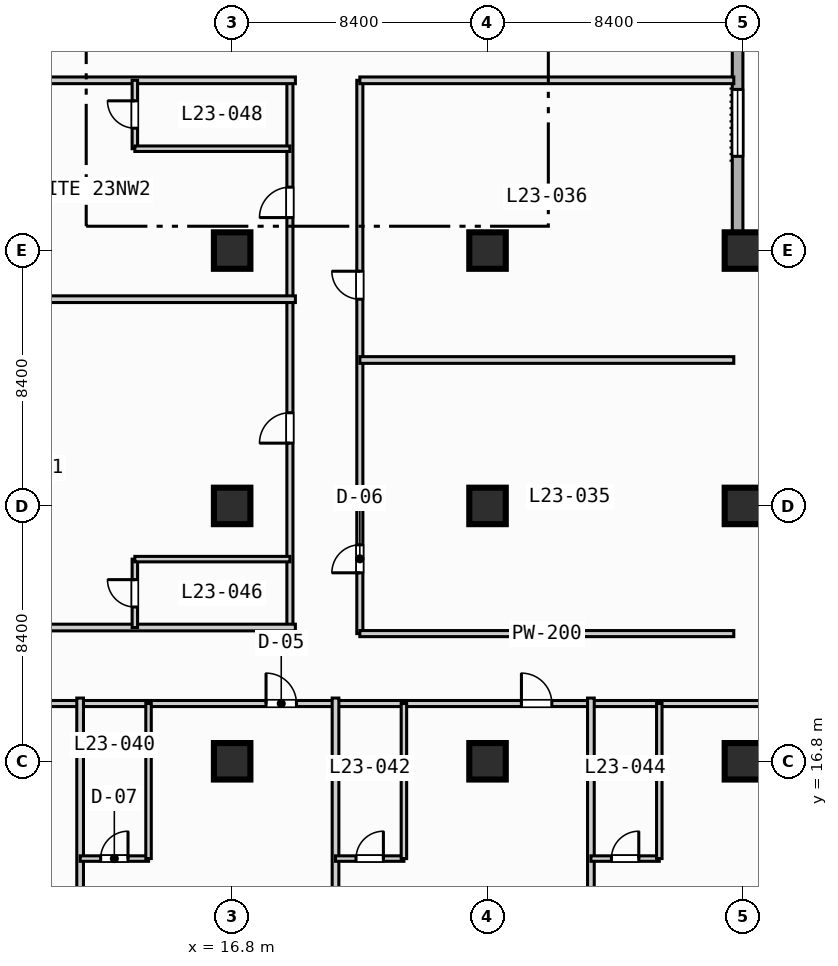
"""IFC4 building model, lengths in metres.
Left out: names, types, materials, properties, quantities, classifications, styles, units other than length and angle.
Written with IfcOpenShell. Run it as: python <this file> out.ifc"""

import sys

from ifc_helpers import new_model, si_unit, direction, frame, frame_2d, origin, origin_2d, place, context, subcontext, project, spatial, rectangle, extrude, element, fill, save


model = new_model("IFC4")
c1 = context("Model", 3, precision=1e-05, world=origin(), true_north=direction((0.0, 1.0)))
c2 = subcontext(c1, "Body", "Model", "MODEL_VIEW")
j1 = project(units=[si_unit("LENGTHUNIT", "METRE"), si_unit("PLANEANGLEUNIT", "RADIAN")], contexts=[c1])
p1 = place(None, origin())
s1 = spatial("IfcSite", under=j1, at=p1, CompositionType="ELEMENT")
p2 = place(p1, origin())
s2 = spatial("IfcBuilding", under=s1, at=p2, CompositionType="ELEMENT")
p3 = place(p2, frame((0.0, 0.0, 100.0)))
s3 = spatial("IfcBuildingStorey", under=s2, at=p3, CompositionType="ELEMENT", Elevation=100.0)
for number, where, z_axis, x_axis in (
    (1, (16.8, 16.8, 0.0), (0.0, 0.0, 1.0), (1.0, 0.0, 0.0)),
    (2, (16.8, 25.2, 0.0), (0.0, 0.0, 1.0), (1.0, 0.0, 0.0)),
    (3, (16.8, 33.6, 0.0), (0.0, 0.0, 1.0), (1.0, 0.0, 0.0)),
    (4, (25.2, 16.8, 0.0), (0.0, 0.0, 1.0), (1.0, 0.0, 0.0)),
    (5, (25.2, 25.2, 0.0), (0.0, 0.0, 1.0), (1.0, 0.0, 0.0)),
    (6, (25.2, 33.6, 0.0), (0.0, 0.0, 1.0), (1.0, 0.0, 0.0)),
    (7, (33.6, 16.8, 0.0), (0.0, 0.0, 1.0), (1.0, 0.0, 0.0)),
    (8, (33.6, 25.2, 0.0), (0.0, 0.0, 1.0), (1.0, 0.0, 0.0)),
    (9, (33.6, 33.6, 0.0), (0.0, 0.0, 1.0), (1.0, 0.0, 0.0)),
):
    element("IfcColumn", number, at=place(p3, frame(where, z_axis=z_axis, x_axis=x_axis)), inside=s3, PredefinedType="COLUMN", context=c2, shape_type="SweptSolid", body=[
        extrude(rectangle(XDim=1.2, YDim=1.2, at=origin_2d()), origin(), (0.0, 0.0, 1.0), 3.8),
    ])
p4 = place(p3, frame((33.425, 89.225, 0.0), z_axis=(0.0, 0.0, 1.0), x_axis=(0.0, -1.0, 0.0)))
e10 = element("IfcWall", 10, at=p4, inside=s3, PredefinedType="STANDARD", context=c2, shape_type="SweptSolid", body=[
    extrude(rectangle(XDim=55.8, YDim=0.35, at=frame_2d((27.9, 0.0))), origin(), (0.0, 0.0, 1.0), 3.55),
])
p5 = place(p4, frame((50.325, 0.0, 0.85)))
e11 = element("IfcOpeningElement", 11, at=p5, cuts=e10, PredefinedType="OPENING", context=c2, shape_type="SweptSolid", body=[
    extrude(rectangle(XDim=2.2, YDim=1.8, at=frame_2d((1.1, 0.9))), frame((0.0, 0.185, 0.0), z_axis=(0.0, -1.0, 0.0), x_axis=(1.0, 0.0, 0.0)), (0.0, 0.0, 1.0), 0.37),
])
p6 = place(p4, frame((33.525, 0.0, 0.85)))
e12 = element("IfcOpeningElement", 12, at=p6, cuts=e10, PredefinedType="OPENING", context=c2, shape_type="SweptSolid", body=[
    extrude(rectangle(XDim=2.2, YDim=1.8, at=frame_2d((1.1, 0.9))), frame((0.0, 0.185, 0.0), z_axis=(0.0, -1.0, 0.0), x_axis=(1.0, 0.0, 0.0)), (0.0, 0.0, 1.0), 0.37),
])
p7 = place(p4, frame((25.125, 0.0, 0.85)))
e13 = element("IfcOpeningElement", 13, at=p7, cuts=e10, PredefinedType="OPENING", context=c2, shape_type="SweptSolid", body=[
    extrude(rectangle(XDim=2.2, YDim=1.8, at=frame_2d((1.1, 0.9))), frame((0.0, 0.185, 0.0), z_axis=(0.0, -1.0, 0.0), x_axis=(1.0, 0.0, 0.0)), (0.0, 0.0, 1.0), 0.37),
])
p8 = place(p4, frame((16.725, 0.0, 0.85)))
e14 = element("IfcOpeningElement", 14, at=p8, cuts=e10, PredefinedType="OPENING", context=c2, shape_type="SweptSolid", body=[
    extrude(rectangle(XDim=2.2, YDim=1.8, at=frame_2d((1.1, 0.9))), frame((0.0, 0.185, 0.0), z_axis=(0.0, -1.0, 0.0), x_axis=(1.0, 0.0, 0.0)), (0.0, 0.0, 1.0), 0.37),
])
p9 = place(p4, frame((8.325, 0.0, 0.85)))
e15 = element("IfcOpeningElement", 15, at=p9, cuts=e10, PredefinedType="OPENING", context=c2, shape_type="SweptSolid", body=[
    extrude(rectangle(XDim=2.2, YDim=1.8, at=frame_2d((1.1, 0.9))), frame((0.0, 0.185, 0.0), z_axis=(0.0, -1.0, 0.0), x_axis=(1.0, 0.0, 0.0)), (0.0, 0.0, 1.0), 0.37),
])
p10 = place(p3, frame((33.425, 33.425, 0.0), z_axis=(0.0, 0.0, 1.0), x_axis=(1.0, 0.0, 0.0)))
e16 = element("IfcWall", 16, at=p10, inside=s3, PredefinedType="STANDARD", context=c2, shape_type="SweptSolid", body=[
    extrude(rectangle(XDim=39.0, YDim=0.35, at=frame_2d((19.5, 0.0))), origin(), (0.0, 0.0, 1.0), 3.55),
])
p11 = place(p10, frame((12.075, 0.0, 0.0)))
e17 = element("IfcOpeningElement", 17, at=p11, cuts=e16, PredefinedType="OPENING", context=c2, shape_type="SweptSolid", body=[
    extrude(rectangle(XDim=1.4, YDim=2.2, at=frame_2d((0.7, 1.1))), frame((0.0, 0.185, 0.0), z_axis=(0.0, -1.0, 0.0), x_axis=(1.0, 0.0, 0.0)), (0.0, 0.0, 1.0), 0.37),
])
p12 = place(p10, frame((20.075, 0.0, 0.85)))
e18 = element("IfcOpeningElement", 18, at=p12, cuts=e16, PredefinedType="OPENING", context=c2, shape_type="SweptSolid", body=[
    extrude(rectangle(XDim=2.2, YDim=1.8, at=frame_2d((1.1, 0.9))), frame((0.0, 0.185, 0.0), z_axis=(0.0, -1.0, 0.0), x_axis=(1.0, 0.0, 0.0)), (0.0, 0.0, 1.0), 0.37),
])
p13 = place(p10, frame((28.475, 0.0, 0.85)))
e19 = element("IfcOpeningElement", 19, at=p13, cuts=e16, PredefinedType="OPENING", context=c2, shape_type="SweptSolid", body=[
    extrude(rectangle(XDim=2.2, YDim=1.8, at=frame_2d((1.1, 0.9))), frame((0.0, 0.185, 0.0), z_axis=(0.0, -1.0, 0.0), x_axis=(1.0, 0.0, 0.0)), (0.0, 0.0, 1.0), 0.37),
])
p14 = place(p3, frame((21.0, 21.0, 0.0), z_axis=(0.0, 0.0, 1.0), x_axis=(0.0, 1.0, 0.0)))
e20 = element("IfcWall", 20, at=p14, inside=s3, PredefinedType="PARTITIONING", context=c2, shape_type="SweptSolid", body=[
    extrude(rectangle(XDim=18.2, YDim=0.2, at=frame_2d((9.1, 0.0))), origin(), (0.0, 0.0, 1.0), 3.55),
])
p15 = place(p14, frame((2.0, 0.0, 0.0)))
e21 = element("IfcOpeningElement", 21, at=p15, cuts=e20, PredefinedType="OPENING", context=c2, shape_type="SweptSolid", body=[
    extrude(rectangle(XDim=0.92, YDim=2.1, at=frame_2d((0.46, 1.05))), frame((0.0, 0.11, 0.0), z_axis=(0.0, -1.0, 0.0), x_axis=(1.0, 0.0, 0.0)), (0.0, 0.0, 1.0), 0.22),
])
p16 = place(p14, frame((11.0, 0.0, 0.0)))
e22 = element("IfcOpeningElement", 22, at=p16, cuts=e20, PredefinedType="OPENING", context=c2, shape_type="SweptSolid", body=[
    extrude(rectangle(XDim=0.92, YDim=2.1, at=frame_2d((0.46, 1.05))), frame((0.0, 0.11, 0.0), z_axis=(0.0, -1.0, 0.0), x_axis=(1.0, 0.0, 0.0)), (0.0, 0.0, 1.0), 0.22),
])
p17 = place(p3, frame((21.0, 21.0, 0.0), z_axis=(0.0, 0.0, 1.0), x_axis=(1.0, 0.0, 0.0)))
e23 = element("IfcWall", 23, at=p17, inside=s3, PredefinedType="PARTITIONING", context=c2, shape_type="SweptSolid", body=[
    extrude(rectangle(XDim=12.3, YDim=0.2, at=frame_2d((6.15, 0.0))), origin(), (0.0, 0.0, 1.0), 3.55),
])
for number, where, z_axis, x_axis in (
    (24, (21.0, 30.0, 0.0), (0.0, 0.0, 1.0), (1.0, 0.0, 0.0)),
    (25, (21.0, 39.2, 0.0), (0.0, 0.0, 1.0), (1.0, 0.0, 0.0)),
):
    element("IfcWall", number, at=place(p3, frame(where, z_axis=z_axis, x_axis=x_axis)), inside=s3, PredefinedType="PARTITIONING", context=c2, shape_type="SweptSolid", body=[
        extrude(rectangle(XDim=12.3, YDim=0.22, at=frame_2d((6.15, 0.0))), origin(), (0.0, 0.0, 1.0), 3.55),
    ])
p18 = place(p3, frame((3.4, 18.7, 0.0), z_axis=(0.0, 0.0, 1.0), x_axis=(1.0, 0.0, 0.0)))
e26 = element("IfcWall", 26, at=p18, inside=s3, PredefinedType="PARTITIONING", context=c2, shape_type="SweptSolid", body=[
    extrude(rectangle(XDim=35.8, YDim=0.2, at=frame_2d((17.9, 0.0))), origin(), (0.0, 0.0, 1.0), 3.55),
])
p19 = place(p18, frame((6.115, 0.0, 0.0)))
e27 = element("IfcOpeningElement", 27, at=p19, cuts=e26, PredefinedType="OPENING", context=c2, shape_type="SweptSolid", body=[
    extrude(rectangle(XDim=1.0, YDim=2.15, at=frame_2d((0.5, 1.075))), frame((0.0, 0.11, 0.0), z_axis=(0.0, -1.0, 0.0), x_axis=(1.0, 0.0, 0.0)), (0.0, 0.0, 1.0), 0.22),
])
p20 = place(p18, frame((14.515, 0.0, 0.0)))
e28 = element("IfcOpeningElement", 28, at=p20, cuts=e26, PredefinedType="OPENING", context=c2, shape_type="SweptSolid", body=[
    extrude(rectangle(XDim=1.0, YDim=2.15, at=frame_2d((0.5, 1.075))), frame((0.0, 0.11, 0.0), z_axis=(0.0, -1.0, 0.0), x_axis=(1.0, 0.0, 0.0)), (0.0, 0.0, 1.0), 0.22),
])
p21 = place(p18, frame((22.915, 0.0, 0.0)))
e29 = element("IfcOpeningElement", 29, at=p21, cuts=e26, PredefinedType="OPENING", context=c2, shape_type="SweptSolid", body=[
    extrude(rectangle(XDim=1.0, YDim=2.15, at=frame_2d((0.5, 1.075))), frame((0.0, 0.11, 0.0), z_axis=(0.0, -1.0, 0.0), x_axis=(1.0, 0.0, 0.0)), (0.0, 0.0, 1.0), 0.22),
])
p22 = place(p18, frame((31.165, 0.0, 0.0)))
e30 = element("IfcOpeningElement", 30, at=p22, cuts=e26, PredefinedType="OPENING", context=c2, shape_type="SweptSolid", body=[
    extrude(rectangle(XDim=1.0, YDim=2.15, at=frame_2d((0.5, 1.075))), frame((0.0, 0.11, 0.0), z_axis=(0.0, -1.0, 0.0), x_axis=(1.0, 0.0, 0.0)), (0.0, 0.0, 1.0), 0.22),
])
p23 = place(p3, frame((11.8, 0.2, 0.0), z_axis=(0.0, 0.0, 1.0), x_axis=(0.0, 1.0, 0.0)))
e31 = element("IfcWall", 31, at=p23, inside=s3, PredefinedType="PARTITIONING", context=c2, shape_type="SweptSolid", body=[
    extrude(rectangle(XDim=18.68, YDim=0.22, at=frame_2d((9.34, 0.0))), origin(), (0.0, 0.0, 1.0), 3.55),
])
p24 = place(p3, frame((11.8, 13.6, 0.0), z_axis=(0.0, 0.0, 1.0), x_axis=(1.0, 0.0, 0.0)))
e32 = element("IfcWall", 32, at=p24, inside=s3, PredefinedType="PLUMBINGWALL", context=c2, shape_type="SweptSolid", body=[
    extrude(rectangle(XDim=2.25, YDim=0.18, at=frame_2d((1.125, 0.0))), origin(), (0.0, 0.0, 1.0), 3.55),
])
p25 = place(p24, frame((0.675, 0.0, 0.0)))
e33 = element("IfcOpeningElement", 33, at=p25, cuts=e32, PredefinedType="OPENING", context=c2, shape_type="SweptSolid", body=[
    extrude(rectangle(XDim=0.9, YDim=2.1, at=frame_2d((0.45, 1.05))), frame((0.0, 0.1, 0.0), z_axis=(0.0, -1.0, 0.0), x_axis=(1.0, 0.0, 0.0)), (0.0, 0.0, 1.0), 0.2),
])
p26 = place(p3, frame((14.05, 13.6, 0.0), z_axis=(0.0, 0.0, 1.0), x_axis=(0.0, 1.0, 0.0)))
e34 = element("IfcWall", 34, at=p26, inside=s3, PredefinedType="PLUMBINGWALL", context=c2, shape_type="SweptSolid", body=[
    extrude(rectangle(XDim=5.1, YDim=0.18, at=frame_2d((2.55, 0.0))), origin(), (0.0, 0.0, 1.0), 3.55),
])
p27 = place(p3, frame((20.2, 0.2, 0.0), z_axis=(0.0, 0.0, 1.0), x_axis=(0.0, 1.0, 0.0)))
e35 = element("IfcWall", 35, at=p27, inside=s3, PredefinedType="PARTITIONING", context=c2, shape_type="SweptSolid", body=[
    extrude(rectangle(XDim=18.68, YDim=0.22, at=frame_2d((9.34, 0.0))), origin(), (0.0, 0.0, 1.0), 3.55),
])
p28 = place(p3, frame((20.2, 13.6, 0.0), z_axis=(0.0, 0.0, 1.0), x_axis=(1.0, 0.0, 0.0)))
e36 = element("IfcWall", 36, at=p28, inside=s3, PredefinedType="PLUMBINGWALL", context=c2, shape_type="SweptSolid", body=[
    extrude(rectangle(XDim=2.25, YDim=0.18, at=frame_2d((1.125, 0.0))), origin(), (0.0, 0.0, 1.0), 3.55),
])
p29 = place(p28, frame((0.675, 0.0, 0.0)))
e37 = element("IfcOpeningElement", 37, at=p29, cuts=e36, PredefinedType="OPENING", context=c2, shape_type="SweptSolid", body=[
    extrude(rectangle(XDim=0.9, YDim=2.1, at=frame_2d((0.45, 1.05))), frame((0.0, 0.1, 0.0), z_axis=(0.0, -1.0, 0.0), x_axis=(1.0, 0.0, 0.0)), (0.0, 0.0, 1.0), 0.2),
])
p30 = place(p3, frame((22.45, 13.6, 0.0), z_axis=(0.0, 0.0, 1.0), x_axis=(0.0, 1.0, 0.0)))
e38 = element("IfcWall", 38, at=p30, inside=s3, PredefinedType="PLUMBINGWALL", context=c2, shape_type="SweptSolid", body=[
    extrude(rectangle(XDim=5.1, YDim=0.18, at=frame_2d((2.55, 0.0))), origin(), (0.0, 0.0, 1.0), 3.55),
])
p31 = place(p3, frame((28.6, 0.2, 0.0), z_axis=(0.0, 0.0, 1.0), x_axis=(0.0, 1.0, 0.0)))
e39 = element("IfcWall", 39, at=p31, inside=s3, PredefinedType="PARTITIONING", context=c2, shape_type="SweptSolid", body=[
    extrude(rectangle(XDim=18.68, YDim=0.22, at=frame_2d((9.34, 0.0))), origin(), (0.0, 0.0, 1.0), 3.55),
])
p32 = place(p3, frame((28.6, 13.6, 0.0), z_axis=(0.0, 0.0, 1.0), x_axis=(1.0, 0.0, 0.0)))
e40 = element("IfcWall", 40, at=p32, inside=s3, PredefinedType="PLUMBINGWALL", context=c2, shape_type="SweptSolid", body=[
    extrude(rectangle(XDim=2.25, YDim=0.18, at=frame_2d((1.125, 0.0))), origin(), (0.0, 0.0, 1.0), 3.55),
])
p33 = place(p32, frame((0.675, 0.0, 0.0)))
e41 = element("IfcOpeningElement", 41, at=p33, cuts=e40, PredefinedType="OPENING", context=c2, shape_type="SweptSolid", body=[
    extrude(rectangle(XDim=0.9, YDim=2.1, at=frame_2d((0.45, 1.05))), frame((0.0, 0.1, 0.0), z_axis=(0.0, -1.0, 0.0), x_axis=(1.0, 0.0, 0.0)), (0.0, 0.0, 1.0), 0.2),
])
p34 = place(p3, frame((30.85, 13.6, 0.0), z_axis=(0.0, 0.0, 1.0), x_axis=(0.0, 1.0, 0.0)))
e42 = element("IfcWall", 42, at=p34, inside=s3, PredefinedType="PLUMBINGWALL", context=c2, shape_type="SweptSolid", body=[
    extrude(rectangle(XDim=5.1, YDim=0.18, at=frame_2d((2.55, 0.0))), origin(), (0.0, 0.0, 1.0), 3.55),
])
p35 = place(p3, frame((18.7, 21.2, 0.0), z_axis=(0.0, 0.0, 1.0), x_axis=(0.0, 1.0, 0.0)))
e43 = element("IfcWall", 43, at=p35, inside=s3, PredefinedType="PARTITIONING", context=c2, shape_type="SweptSolid", body=[
    extrude(rectangle(XDim=18.0, YDim=0.2, at=frame_2d((9.0, 0.0))), origin(), (0.0, 0.0, 1.0), 3.55),
])
p36 = place(p35, frame((6.065, 0.0, 0.0)))
e44 = element("IfcOpeningElement", 44, at=p36, cuts=e43, PredefinedType="OPENING", context=c2, shape_type="SweptSolid", body=[
    extrude(rectangle(XDim=1.0, YDim=2.15, at=frame_2d((0.5, 1.075))), frame((0.0, 0.11, 0.0), z_axis=(0.0, -1.0, 0.0), x_axis=(1.0, 0.0, 0.0)), (0.0, 0.0, 1.0), 0.22),
])
p37 = place(p35, frame((13.485, 0.0, 0.0)))
e45 = element("IfcOpeningElement", 45, at=p37, cuts=e43, PredefinedType="OPENING", context=c2, shape_type="SweptSolid", body=[
    extrude(rectangle(XDim=1.0, YDim=2.15, at=frame_2d((0.5, 1.075))), frame((0.0, 0.11, 0.0), z_axis=(0.0, -1.0, 0.0), x_axis=(1.0, 0.0, 0.0)), (0.0, 0.0, 1.0), 0.22),
])
p38 = place(p3, frame((0.2, 21.2, 0.0), z_axis=(0.0, 0.0, 1.0), x_axis=(1.0, 0.0, 0.0)))
e46 = element("IfcWall", 46, at=p38, inside=s3, PredefinedType="PARTITIONING", context=c2, shape_type="SweptSolid", body=[
    extrude(rectangle(XDim=18.68, YDim=0.22, at=frame_2d((9.34, 0.0))), origin(), (0.0, 0.0, 1.0), 3.55),
])
p39 = place(p3, frame((13.6, 21.2, 0.0), z_axis=(0.0, 0.0, 1.0), x_axis=(0.0, 1.0, 0.0)))
e47 = element("IfcWall", 47, at=p39, inside=s3, PredefinedType="PLUMBINGWALL", context=c2, shape_type="SweptSolid", body=[
    extrude(rectangle(XDim=2.25, YDim=0.18, at=frame_2d((1.125, 0.0))), origin(), (0.0, 0.0, 1.0), 3.55),
])
p40 = place(p39, frame((0.675, 0.0, 0.0)))
e48 = element("IfcOpeningElement", 48, at=p40, cuts=e47, PredefinedType="OPENING", context=c2, shape_type="SweptSolid", body=[
    extrude(rectangle(XDim=0.9, YDim=2.1, at=frame_2d((0.45, 1.05))), frame((0.0, 0.1, 0.0), z_axis=(0.0, -1.0, 0.0), x_axis=(1.0, 0.0, 0.0)), (0.0, 0.0, 1.0), 0.2),
])
p41 = place(p3, frame((13.6, 23.45, 0.0), z_axis=(0.0, 0.0, 1.0), x_axis=(1.0, 0.0, 0.0)))
e49 = element("IfcWall", 49, at=p41, inside=s3, PredefinedType="PLUMBINGWALL", context=c2, shape_type="SweptSolid", body=[
    extrude(rectangle(XDim=5.1, YDim=0.18, at=frame_2d((2.55, 0.0))), origin(), (0.0, 0.0, 1.0), 3.55),
])
for number, where, z_axis, x_axis in (
    (50, (0.2, 32.0, 0.0), (0.0, 0.0, 1.0), (1.0, 0.0, 0.0)),
    (51, (0.2, 39.2, 0.0), (0.0, 0.0, 1.0), (1.0, 0.0, 0.0)),
):
    element("IfcWall", number, at=place(p3, frame(where, z_axis=z_axis, x_axis=x_axis)), inside=s3, PredefinedType="PARTITIONING", context=c2, shape_type="SweptSolid", body=[
        extrude(rectangle(XDim=18.68, YDim=0.22, at=frame_2d((9.34, 0.0))), origin(), (0.0, 0.0, 1.0), 3.55),
    ])
p42 = place(p3, frame((13.6, 36.95, 0.0), z_axis=(0.0, 0.0, 1.0), x_axis=(0.0, 1.0, 0.0)))
e52 = element("IfcWall", 52, at=p42, inside=s3, PredefinedType="PLUMBINGWALL", context=c2, shape_type="SweptSolid", body=[
    extrude(rectangle(XDim=2.25, YDim=0.18, at=frame_2d((1.125, 0.0))), origin(), (0.0, 0.0, 1.0), 3.55),
])
p43 = place(p42, frame((0.675, 0.0, 0.0)))
e53 = element("IfcOpeningElement", 53, at=p43, cuts=e52, PredefinedType="OPENING", context=c2, shape_type="SweptSolid", body=[
    extrude(rectangle(XDim=0.9, YDim=2.1, at=frame_2d((0.45, 1.05))), frame((0.0, 0.1, 0.0), z_axis=(0.0, -1.0, 0.0), x_axis=(1.0, 0.0, 0.0)), (0.0, 0.0, 1.0), 0.2),
])
p44 = place(p3, frame((13.6, 36.95, 0.0), z_axis=(0.0, 0.0, 1.0), x_axis=(1.0, 0.0, 0.0)))
e54 = element("IfcWall", 54, at=p44, inside=s3, PredefinedType="PLUMBINGWALL", context=c2, shape_type="SweptSolid", body=[
    extrude(rectangle(XDim=5.1, YDim=0.18, at=frame_2d((2.55, 0.0))), origin(), (0.0, 0.0, 1.0), 3.55),
])
p45 = place(p5, origin())
e55 = element("IfcWindow", 55, at=p45, inside=s3, PartitioningType="SINGLE_PANEL", PredefinedType="WINDOW", context=c2, shape_type="SweptSolid", body=[
    extrude(rectangle(XDim=2.2, YDim=1.8, at=frame_2d((1.1, 0.9))), frame((0.0, 0.03, 0.0), z_axis=(0.0, -1.0, 0.0), x_axis=(1.0, 0.0, 0.0)), (0.0, 0.0, 1.0), 0.06),
])
fill(e11, e55)
p46 = place(p15, origin())
e56 = element("IfcDoor", 56, at=p46, inside=s3, OperationType="SINGLE_SWING_LEFT", PredefinedType="DOOR", context=c2, shape_type="SweptSolid", body=[
    extrude(rectangle(XDim=0.92, YDim=2.1, at=frame_2d((0.46, 1.05))), frame((0.0, 0.025, 0.0), z_axis=(0.0, -1.0, 0.0), x_axis=(1.0, 0.0, 0.0)), (0.0, 0.0, 1.0), 0.05),
])
fill(e21, e56)
p47 = place(p16, origin())
e57 = element("IfcDoor", 57, at=p47, inside=s3, OperationType="SINGLE_SWING_RIGHT", PredefinedType="DOOR", context=c2, shape_type="SweptSolid", body=[
    extrude(rectangle(XDim=0.92, YDim=2.1, at=frame_2d((0.46, 1.05))), frame((0.0, 0.025, 0.0), z_axis=(0.0, -1.0, 0.0), x_axis=(1.0, 0.0, 0.0)), (0.0, 0.0, 1.0), 0.05),
])
fill(e22, e57)
p48 = place(p20, origin())
e58 = element("IfcDoor", 58, at=p48, inside=s3, OperationType="SINGLE_SWING_LEFT", PredefinedType="DOOR", context=c2, shape_type="SweptSolid", body=[
    extrude(rectangle(XDim=1.0, YDim=2.15, at=frame_2d((0.5, 1.075))), frame((0.0, 0.025, 0.0), z_axis=(0.0, -1.0, 0.0), x_axis=(1.0, 0.0, 0.0)), (0.0, 0.0, 1.0), 0.05),
])
fill(e28, e58)
p49 = place(p21, origin())
e59 = element("IfcDoor", 59, at=p49, inside=s3, OperationType="SINGLE_SWING_LEFT", PredefinedType="DOOR", context=c2, shape_type="SweptSolid", body=[
    extrude(rectangle(XDim=1.0, YDim=2.15, at=frame_2d((0.5, 1.075))), frame((0.0, 0.025, 0.0), z_axis=(0.0, -1.0, 0.0), x_axis=(1.0, 0.0, 0.0)), (0.0, 0.0, 1.0), 0.05),
])
fill(e29, e59)
p50 = place(p25, origin())
e60 = element("IfcDoor", 60, at=p50, inside=s3, OperationType="SINGLE_SWING_RIGHT", PredefinedType="DOOR", context=c2, shape_type="SweptSolid", body=[
    extrude(rectangle(XDim=0.9, YDim=2.1, at=frame_2d((0.45, 1.05))), frame((0.0, 0.025, 0.0), z_axis=(0.0, -1.0, 0.0), x_axis=(1.0, 0.0, 0.0)), (0.0, 0.0, 1.0), 0.05),
])
fill(e33, e60)
p51 = place(p29, origin())
e61 = element("IfcDoor", 61, at=p51, inside=s3, OperationType="SINGLE_SWING_RIGHT", PredefinedType="DOOR", context=c2, shape_type="SweptSolid", body=[
    extrude(rectangle(XDim=0.9, YDim=2.1, at=frame_2d((0.45, 1.05))), frame((0.0, 0.025, 0.0), z_axis=(0.0, -1.0, 0.0), x_axis=(1.0, 0.0, 0.0)), (0.0, 0.0, 1.0), 0.05),
])
fill(e37, e61)
p52 = place(p33, origin())
e62 = element("IfcDoor", 62, at=p52, inside=s3, OperationType="SINGLE_SWING_RIGHT", PredefinedType="DOOR", context=c2, shape_type="SweptSolid", body=[
    extrude(rectangle(XDim=0.9, YDim=2.1, at=frame_2d((0.45, 1.05))), frame((0.0, 0.025, 0.0), z_axis=(0.0, -1.0, 0.0), x_axis=(1.0, 0.0, 0.0)), (0.0, 0.0, 1.0), 0.05),
])
fill(e41, e62)
p53 = place(p36, origin())
e63 = element("IfcDoor", 63, at=p53, inside=s3, OperationType="SINGLE_SWING_LEFT", PredefinedType="DOOR", context=c2, shape_type="SweptSolid", body=[
    extrude(rectangle(XDim=1.0, YDim=2.15, at=frame_2d((0.5, 1.075))), frame((0.0, 0.025, 0.0), z_axis=(0.0, -1.0, 0.0), x_axis=(1.0, 0.0, 0.0)), (0.0, 0.0, 1.0), 0.05),
])
fill(e44, e63)
p54 = place(p37, origin())
e64 = element("IfcDoor", 64, at=p54, inside=s3, OperationType="SINGLE_SWING_LEFT", PredefinedType="DOOR", context=c2, shape_type="SweptSolid", body=[
    extrude(rectangle(XDim=1.0, YDim=2.15, at=frame_2d((0.5, 1.075))), frame((0.0, 0.025, 0.0), z_axis=(0.0, -1.0, 0.0), x_axis=(1.0, 0.0, 0.0)), (0.0, 0.0, 1.0), 0.05),
])
fill(e45, e64)
p55 = place(p40, origin())
e65 = element("IfcDoor", 65, at=p55, inside=s3, OperationType="SINGLE_SWING_RIGHT", PredefinedType="DOOR", context=c2, shape_type="SweptSolid", body=[
    extrude(rectangle(XDim=0.9, YDim=2.1, at=frame_2d((0.45, 1.05))), frame((0.0, 0.025, 0.0), z_axis=(0.0, -1.0, 0.0), x_axis=(1.0, 0.0, 0.0)), (0.0, 0.0, 1.0), 0.05),
])
fill(e48, e65)
p56 = place(p43, origin())
e66 = element("IfcDoor", 66, at=p56, inside=s3, OperationType="SINGLE_SWING_RIGHT", PredefinedType="DOOR", context=c2, shape_type="SweptSolid", body=[
    extrude(rectangle(XDim=0.9, YDim=2.1, at=frame_2d((0.45, 1.05))), frame((0.0, 0.025, 0.0), z_axis=(0.0, -1.0, 0.0), x_axis=(1.0, 0.0, 0.0)), (0.0, 0.0, 1.0), 0.05),
])
fill(e53, e66)
save(model, sys.argv[1])
